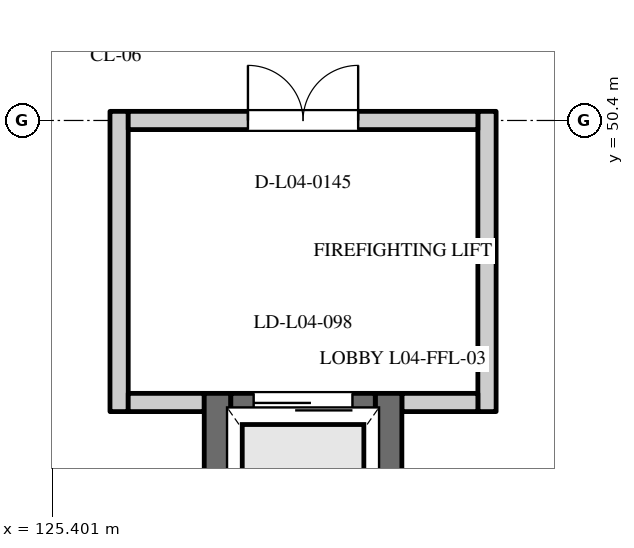
"""IFC4 building model, lengths in metres.
Left out: names, types, materials, properties, quantities, classifications, styles, units other than length and angle.
Written with IfcOpenShell. Run it as: python <this file> out.ifc"""

import sys

from ifc_helpers import new_model, si_unit, direction, frame, frame_2d, origin, place, context, subcontext, project, spatial, rectangle, extrude, element, fill, save


model = new_model("IFC4")
c1 = context("Model", 3, precision=1e-05, world=origin(), true_north=direction((0.0, 1.0)))
c2 = subcontext(c1, "Body", "Model", "MODEL_VIEW")
j1 = project(units=[si_unit("LENGTHUNIT", "METRE"), si_unit("PLANEANGLEUNIT", "RADIAN")], contexts=[c1])
p1 = place(None, origin())
s1 = spatial("IfcSite", under=j1, at=p1, CompositionType="ELEMENT")
p2 = place(p1, origin())
s2 = spatial("IfcBuilding", under=s1, at=p2, CompositionType="ELEMENT")
p3 = place(p2, frame((0.0, 0.0, 18.0)))
s3 = spatial("IfcBuildingStorey", under=s2, at=p3, CompositionType="ELEMENT", Elevation=18.0)
for number, where, z_axis, x_axis in (
    (1, (127.575, 43.06, 0.0), (0.0, 0.0, 1.0), (0.0, 1.0, 0.0)),
    (2, (129.825, 43.06, 0.0), (0.0, 0.0, 1.0), (0.0, 1.0, 0.0)),
):
    element("IfcWall", number, at=place(p3, frame(where, z_axis=z_axis, x_axis=x_axis)), inside=s3, PredefinedType="SHEAR", context=c2, shape_type="SweptSolid", body=[
        extrude(rectangle(XDim=3.75, YDim=0.35, at=frame_2d((1.875, 0.0))), origin(), (0.0, 0.0, 1.0), 4.2),
    ])
p4 = place(p3, frame((127.75, 46.635, 0.0), z_axis=(0.0, 0.0, 1.0), x_axis=(1.0, 0.0, 0.0)))
e3 = element("IfcWall", 3, at=p4, inside=s3, PredefinedType="SHEAR", context=c2, shape_type="SweptSolid", body=[
    extrude(rectangle(XDim=1.9, YDim=0.35, at=frame_2d((0.95, 0.0))), origin(), (0.0, 0.0, 1.0), 3.885),
])
p5 = place(p4, frame((0.3, 0.0, 0.0)))
e4 = element("IfcOpeningElement", 4, at=p5, cuts=e3, PredefinedType="OPENING", context=c2, shape_type="SweptSolid", body=[
    extrude(rectangle(XDim=1.3, YDim=2.2, at=frame_2d((0.65, 1.1))), frame((0.0, 0.187, 0.0), z_axis=(0.0, -1.0, 0.0), x_axis=(1.0, 0.0, 0.0)), (0.0, 0.0, 1.0), 0.374),
])
for number, where, z_axis, x_axis in (
    (5, (126.28, 46.57, 0.0), (0.0, 0.0, 1.0), (0.0, 1.0, 0.0)),
    (6, (131.12, 46.57, 0.0), (0.0, 0.0, 1.0), (0.0, 1.0, 0.0)),
):
    element("IfcWall", number, at=place(p3, frame(where, z_axis=z_axis, x_axis=x_axis)), inside=s3, PredefinedType="STANDARD", context=c2, shape_type="SweptSolid", body=[
        extrude(rectangle(XDim=3.95, YDim=0.24, at=frame_2d((1.975, 0.0))), origin(), (0.0, 0.0, 1.0), 3.385),
    ])
for number, where, z_axis, x_axis in (
    (7, (126.4, 46.69, 0.0), (0.0, 0.0, 1.0), (1.0, 0.0, 0.0)),
    (8, (130.0, 46.69, 0.0), (0.0, 0.0, 1.0), (1.0, 0.0, 0.0)),
):
    element("IfcWall", number, at=place(p3, frame(where, z_axis=z_axis, x_axis=x_axis)), inside=s3, PredefinedType="STANDARD", context=c2, shape_type="SweptSolid", body=[
        extrude(rectangle(XDim=1.0, YDim=0.24, at=frame_2d((0.5, 0.0))), origin(), (0.0, 0.0, 1.0), 3.385),
    ])
p6 = place(p3, frame((126.4, 50.4, 0.0), z_axis=(0.0, 0.0, 1.0), x_axis=(1.0, 0.0, 0.0)))
e9 = element("IfcWall", 9, at=p6, inside=s3, PredefinedType="STANDARD", context=c2, shape_type="SweptSolid", body=[
    extrude(rectangle(XDim=4.6, YDim=0.24, at=frame_2d((2.3, 0.0))), origin(), (0.0, 0.0, 1.0), 3.385),
])
p7 = place(p6, frame((1.575, 0.0, 0.0)))
e10 = element("IfcOpeningElement", 10, at=p7, cuts=e9, PredefinedType="OPENING", context=c2, shape_type="SweptSolid", body=[
    extrude(rectangle(XDim=1.45, YDim=2.2, at=frame_2d((0.725, 1.1))), frame((0.0, 0.132, 0.0), z_axis=(0.0, -1.0, 0.0), x_axis=(1.0, 0.0, 0.0)), (0.0, 0.0, 1.0), 0.264),
])
p8 = place(p5, origin())
e11 = element("IfcDoor", 11, at=p8, inside=s3, OperationType="SLIDING_TO_LEFT", PredefinedType="DOOR", context=c2, shape_type="SweptSolid", body=[
    extrude(rectangle(XDim=1.3, YDim=2.2, at=frame_2d((0.65, 1.1))), frame((0.0, 0.025, 0.0), z_axis=(0.0, -1.0, 0.0), x_axis=(1.0, 0.0, 0.0)), (0.0, 0.0, 1.0), 0.05),
])
fill(e4, e11)
p9 = place(p7, origin())
e12 = element("IfcDoor", 12, at=p9, inside=s3, OperationType="DOUBLE_DOOR_SINGLE_SWING", PredefinedType="DOOR", context=c2, shape_type="SweptSolid", body=[
    extrude(rectangle(XDim=1.45, YDim=2.2, at=frame_2d((0.725, 1.1))), frame((0.0, 0.025, 0.0), z_axis=(0.0, -1.0, 0.0), x_axis=(1.0, 0.0, 0.0)), (0.0, 0.0, 1.0), 0.05),
])
fill(e10, e12)
save(model, sys.argv[1])
